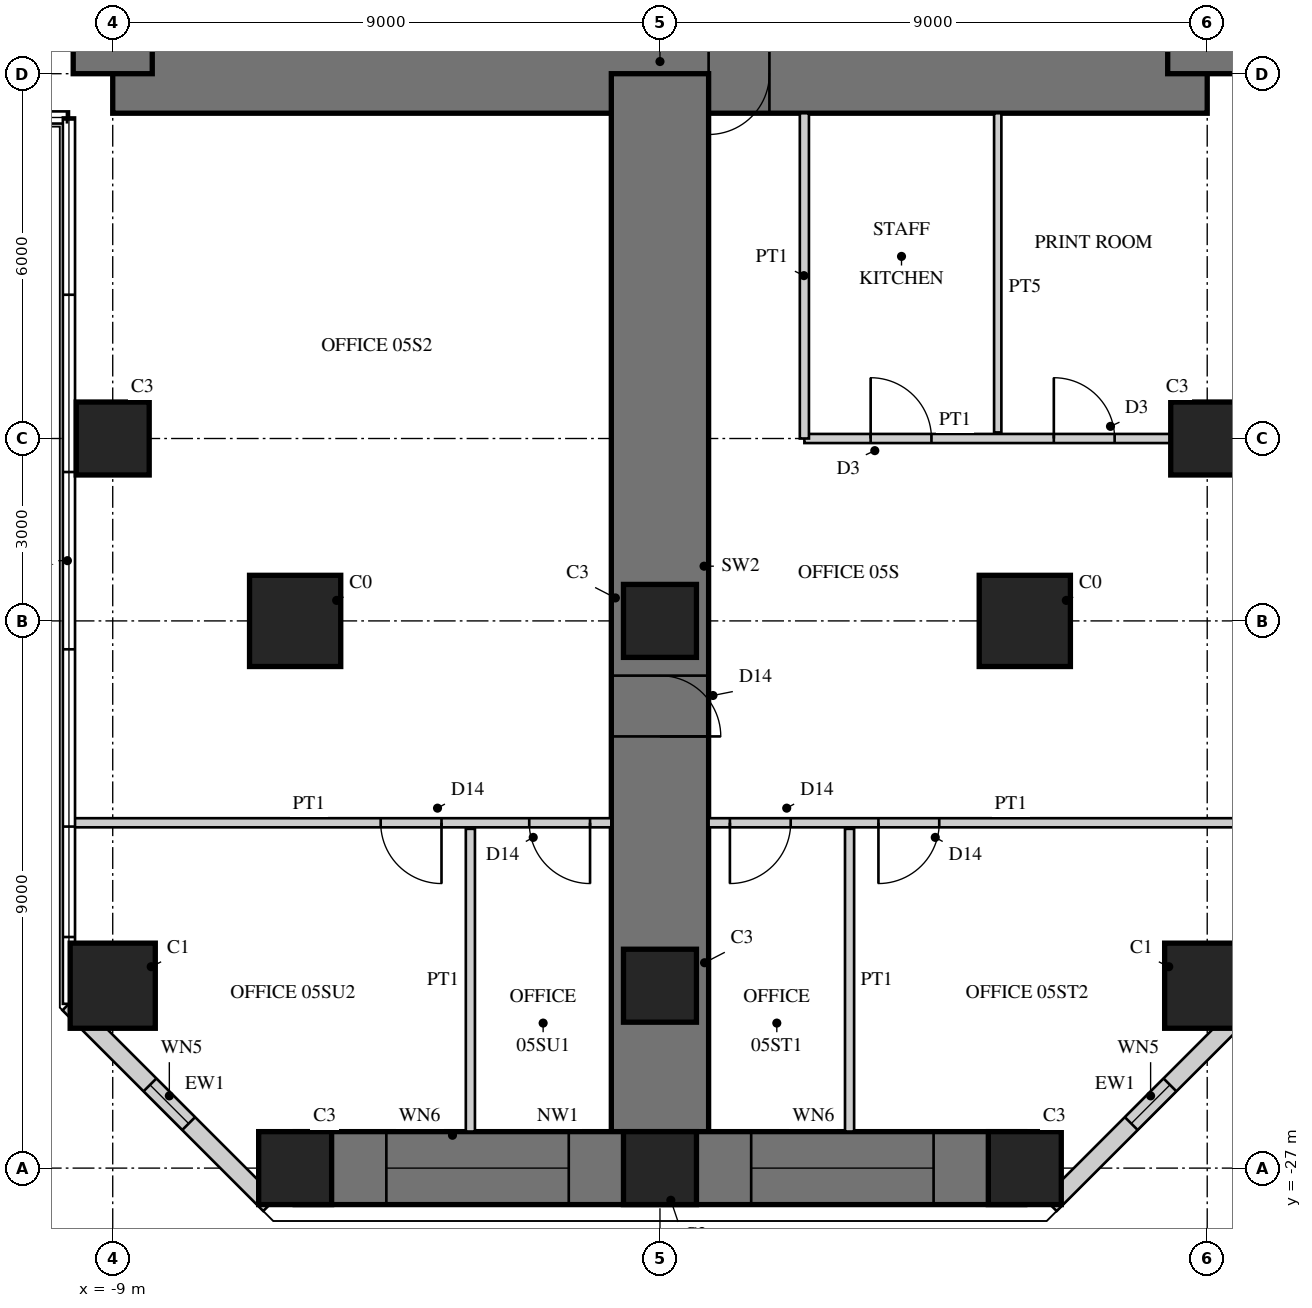
"""IFC4 building model, lengths in metres.
Left out: names, types, materials, properties, quantities, classifications, styles, units other than length and angle.
Written with IfcOpenShell. Run it as: python <this file> out.ifc"""

import sys

from ifc_helpers import new_model, si_unit, direction, frame, frame_2d, origin, origin_2d, place, context, subcontext, project, spatial, rectangle, hollow_rectangle, extrude, element, fill, save


model = new_model("IFC4")
c1 = context("Model", 3, precision=1e-05, world=origin(), true_north=direction((0.0, 1.0)))
c2 = subcontext(c1, "Body", "Model", "MODEL_VIEW")
j1 = project(units=[si_unit("LENGTHUNIT", "METRE"), si_unit("PLANEANGLEUNIT", "RADIAN")], contexts=[c1])
p1 = place(None, origin())
s1 = spatial("IfcSite", under=j1, at=p1, CompositionType="ELEMENT")
p2 = place(p1, origin())
s2 = spatial("IfcBuilding", under=s1, at=p2, CompositionType="ELEMENT")
p3 = place(p2, frame((0.0, 0.0, 23.5)))
s3 = spatial("IfcBuildingStorey", under=s2, at=p3, CompositionType="ELEMENT", Elevation=23.5)
p4 = place(p3, frame((-9.0, -9.0, 0.0), z_axis=(0.0, 0.0, 1.0), x_axis=(1.0, 0.0, 0.0)))
e1 = element("IfcWall", 1, at=p4, inside=s3, PredefinedType="SHEAR", context=c2, shape_type="SweptSolid", body=[
    extrude(rectangle(XDim=18.0, YDim=1.3, at=frame_2d((9.0, 0.0))), origin(), (0.0, 0.0, 1.0), 4.0),
])
p5 = place(p4, frame((9.8, 0.0, 0.0)))
e2 = element("IfcOpeningElement", 2, at=p5, cuts=e1, PredefinedType="OPENING", context=c2, shape_type="SweptSolid", body=[
    extrude(rectangle(XDim=1.0, YDim=2.4, at=frame_2d((0.5, 1.2))), frame((0.0, 0.66, 0.0), z_axis=(0.0, -1.0, 0.0), x_axis=(1.0, 0.0, 0.0)), (0.0, 0.0, 1.0), 1.32),
])
p6 = place(p3, frame((9.0, -9.0, 0.0), z_axis=(0.0, 0.0, 1.0), x_axis=(0.0, 1.0, 0.0)))
e3 = element("IfcWall", 3, at=p6, inside=s3, PredefinedType="SHEAR", context=c2, shape_type="SweptSolid", body=[
    extrude(rectangle(XDim=18.0, YDim=1.3, at=frame_2d((9.0, 0.0))), origin(), (0.0, 0.0, 1.0), 4.0),
])
p7 = place(p6, frame((9.8, 0.0, 0.0)))
e4 = element("IfcOpeningElement", 4, at=p7, cuts=e3, PredefinedType="OPENING", context=c2, shape_type="SweptSolid", body=[
    extrude(rectangle(XDim=1.0, YDim=2.4, at=frame_2d((0.5, 1.2))), frame((0.0, 0.66, 0.0), z_axis=(0.0, -1.0, 0.0), x_axis=(1.0, 0.0, 0.0)), (0.0, 0.0, 1.0), 1.32),
])
p8 = place(p3, frame((-9.0, 9.0, 0.0), z_axis=(0.0, 0.0, 1.0), x_axis=(0.0, -1.0, 0.0)))
e5 = element("IfcWall", 5, at=p8, inside=s3, PredefinedType="SHEAR", context=c2, shape_type="SweptSolid", body=[
    extrude(rectangle(XDim=18.0, YDim=1.3, at=frame_2d((9.0, 0.0))), origin(), (0.0, 0.0, 1.0), 4.0),
])
p9 = place(p8, frame((9.8, 0.0, 0.0)))
e6 = element("IfcOpeningElement", 6, at=p9, cuts=e5, PredefinedType="OPENING", context=c2, shape_type="SweptSolid", body=[
    extrude(rectangle(XDim=1.0, YDim=2.4, at=frame_2d((0.5, 1.2))), frame((0.0, 0.66, 0.0), z_axis=(0.0, -1.0, 0.0), x_axis=(1.0, 0.0, 0.0)), (0.0, 0.0, 1.0), 1.32),
])
p10 = place(p3, frame((0.0, -9.0, 0.0), z_axis=(0.0, 0.0, 1.0), x_axis=(0.0, -1.0, 0.0)))
e7 = element("IfcWall", 7, at=p10, inside=s3, PredefinedType="SHEAR", context=c2, shape_type="SweptSolid", body=[
    extrude(rectangle(XDim=18.0, YDim=1.6, at=frame_2d((9.0, 0.0))), origin(), (0.0, 0.0, 1.0), 4.0),
])
p11 = place(p10, frame((9.9, 0.0, 0.0)))
e8 = element("IfcOpeningElement", 8, at=p11, cuts=e7, PredefinedType="OPENING", context=c2, shape_type="SweptSolid", body=[
    extrude(rectangle(XDim=1.0, YDim=2.2, at=frame_2d((0.5, 1.1))), frame((0.0, 0.81, 0.0), z_axis=(0.0, -1.0, 0.0), x_axis=(1.0, 0.0, 0.0)), (0.0, 0.0, 1.0), 1.62),
])
p12 = place(p3, frame((-6.0, -27.0, 0.0), z_axis=(0.0, 0.0, 1.0), x_axis=(1.0, 0.0, 0.0)))
e9 = element("IfcWall", 9, at=p12, inside=s3, PredefinedType="SHEAR", context=c2, shape_type="SweptSolid", body=[
    extrude(rectangle(XDim=12.0, YDim=1.2, at=frame_2d((6.0, 0.0))), origin(), (0.0, 0.0, 1.0), 4.0),
])
p13 = place(p12, frame((1.5, 0.0, 0.6)))
e10 = element("IfcOpeningElement", 10, at=p13, cuts=e9, PredefinedType="OPENING", context=c2, shape_type="SweptSolid", body=[
    extrude(rectangle(XDim=3.0, YDim=2.4, at=frame_2d((1.5, 1.2))), frame((0.0, 0.61, 0.0), z_axis=(0.0, -1.0, 0.0), x_axis=(1.0, 0.0, 0.0)), (0.0, 0.0, 1.0), 1.22),
])
p14 = place(p12, frame((7.5, 0.0, 0.6)))
e11 = element("IfcOpeningElement", 11, at=p14, cuts=e9, PredefinedType="OPENING", context=c2, shape_type="SweptSolid", body=[
    extrude(rectangle(XDim=3.0, YDim=2.4, at=frame_2d((1.5, 1.2))), frame((0.0, 0.61, 0.0), z_axis=(0.0, -1.0, 0.0), x_axis=(1.0, 0.0, 0.0)), (0.0, 0.0, 1.0), 1.22),
])
p15 = place(p3, frame((-9.0, -15.0, 0.0), z_axis=(0.0, 0.0, 1.0), x_axis=(1.0, 0.0, 0.0)))
e12 = element("IfcColumn", 12, at=p15, inside=s3, PredefinedType="COLUMN", context=c2, shape_type="SweptSolid", body=[
    extrude(rectangle(XDim=1.2, YDim=1.2, at=origin_2d()), origin(), (0.0, 0.0, 1.0), 4.0),
])
p16 = place(p3, frame((-9.0, -24.0, 0.0), z_axis=(0.0, 0.0, 1.0), x_axis=(1.0, 0.0, 0.0)))
e13 = element("IfcColumn", 13, at=p16, inside=s3, PredefinedType="COLUMN", context=c2, shape_type="SweptSolid", body=[
    extrude(rectangle(XDim=1.4, YDim=1.4, at=origin_2d()), origin(), (0.0, 0.0, 1.0), 4.0),
])
p17 = place(p3, frame((9.0, -15.0, 0.0), z_axis=(0.0, 0.0, 1.0), x_axis=(1.0, 0.0, 0.0)))
e14 = element("IfcColumn", 14, at=p17, inside=s3, PredefinedType="COLUMN", context=c2, shape_type="SweptSolid", body=[
    extrude(rectangle(XDim=1.2, YDim=1.2, at=origin_2d()), origin(), (0.0, 0.0, 1.0), 4.0),
])
p18 = place(p3, frame((9.0, -24.0, 0.0), z_axis=(0.0, 0.0, 1.0), x_axis=(1.0, 0.0, 0.0)))
e15 = element("IfcColumn", 15, at=p18, inside=s3, PredefinedType="COLUMN", context=c2, shape_type="SweptSolid", body=[
    extrude(rectangle(XDim=1.4, YDim=1.4, at=origin_2d()), origin(), (0.0, 0.0, 1.0), 4.0),
])
for number, where, z_axis, x_axis in (
    (16, (-6.0, -27.0, 0.0), (0.0, 0.0, 1.0), (1.0, 0.0, 0.0)),
    (17, (0.0, -27.0, 0.0), (0.0, 0.0, 1.0), (1.0, 0.0, 0.0)),
    (18, (6.0, -27.0, 0.0), (0.0, 0.0, 1.0), (1.0, 0.0, 0.0)),
):
    element("IfcColumn", number, at=place(p3, frame(where, z_axis=z_axis, x_axis=x_axis)), inside=s3, PredefinedType="COLUMN", context=c2, shape_type="SweptSolid", body=[
        extrude(rectangle(XDim=1.2, YDim=1.2, at=origin_2d()), origin(), (0.0, 0.0, 1.0), 4.0),
    ])
p19 = place(p3, frame((-6.0, -18.0, -0.2), z_axis=(0.0, 0.0, 1.0), x_axis=(1.0, 0.0, 0.0)))
e19 = element("IfcColumn", 19, at=p19, inside=s3, PredefinedType="COLUMN", context=c2, shape_type="SweptSolid", body=[
    extrude(rectangle(XDim=1.5, YDim=1.5, at=origin_2d()), origin(), (0.0, 0.0, 1.0), 4.2),
])
p20 = place(p3, frame((0.0, -18.0, 0.0), z_axis=(0.0, 0.0, 1.0), x_axis=(1.0, 0.0, 0.0)))
e20 = element("IfcColumn", 20, at=p20, inside=s3, PredefinedType="COLUMN", context=c2, shape_type="SweptSolid", body=[
    extrude(rectangle(XDim=1.2, YDim=1.2, at=origin_2d()), origin(), (0.0, 0.0, 1.0), 4.0),
])
p21 = place(p3, frame((6.0, -18.0, -0.2), z_axis=(0.0, 0.0, 1.0), x_axis=(1.0, 0.0, 0.0)))
e21 = element("IfcColumn", 21, at=p21, inside=s3, PredefinedType="COLUMN", context=c2, shape_type="SweptSolid", body=[
    extrude(rectangle(XDim=1.5, YDim=1.5, at=origin_2d()), origin(), (0.0, 0.0, 1.0), 4.2),
])
p22 = place(p3, frame((0.0, -24.0, 0.0), z_axis=(0.0, 0.0, 1.0), x_axis=(1.0, 0.0, 0.0)))
e22 = element("IfcColumn", 22, at=p22, inside=s3, PredefinedType="COLUMN", context=c2, shape_type="SweptSolid", body=[
    extrude(rectangle(XDim=1.2, YDim=1.2, at=origin_2d()), origin(), (0.0, 0.0, 1.0), 4.0),
])
p23 = place(p3, frame((-9.72, -24.298, 0.0), z_axis=(0.0, 0.0, 1.0), x_axis=(0.707106781187, -0.707106781187, 0.0)))
e23 = element("IfcWall", 23, at=p23, inside=s3, PredefinedType="SOLIDWALL", context=c2, shape_type="SweptSolid", body=[
    extrude(rectangle(XDim=4.669, YDim=0.3, at=frame_2d((2.335, 0.0))), origin(), (0.0, 0.0, 1.0), 3.8),
])
p24 = place(p23, frame((1.885, 0.0, 0.3)))
e24 = element("IfcOpeningElement", 24, at=p24, cuts=e23, PredefinedType="OPENING", context=c2, shape_type="SweptSolid", body=[
    extrude(rectangle(XDim=0.9, YDim=2.4, at=frame_2d((0.45, 1.2))), frame((0.0, 0.16, 0.0), z_axis=(0.0, -1.0, 0.0), x_axis=(1.0, 0.0, 0.0)), (0.0, 0.0, 1.0), 0.32),
])
p25 = place(p3, frame((6.418, -27.6, 0.0), z_axis=(0.0, 0.0, 1.0), x_axis=(0.707106781187, 0.707106781187, 0.0)))
e25 = element("IfcWall", 25, at=p25, inside=s3, PredefinedType="SOLIDWALL", context=c2, shape_type="SweptSolid", body=[
    extrude(rectangle(XDim=4.669, YDim=0.3, at=frame_2d((2.335, 0.0))), origin(), (0.0, 0.0, 1.0), 3.8),
])
p26 = place(p25, frame((1.885, 0.0, 0.3)))
e26 = element("IfcOpeningElement", 26, at=p26, cuts=e25, PredefinedType="OPENING", context=c2, shape_type="SweptSolid", body=[
    extrude(rectangle(XDim=0.9, YDim=2.4, at=frame_2d((0.45, 1.2))), frame((0.0, 0.16, 0.0), z_axis=(0.0, -1.0, 0.0), x_axis=(1.0, 0.0, 0.0)), (0.0, 0.0, 1.0), 0.32),
])
p27 = place(p3, frame((2.375, -15.0, 0.0), z_axis=(0.0, 0.0, 1.0), x_axis=(1.0, 0.0, 0.0)))
e27 = element("IfcWall", 27, at=p27, inside=s3, PredefinedType="PARTITIONING", context=c2, shape_type="SweptSolid", body=[
    extrude(rectangle(XDim=6.025, YDim=0.15, at=frame_2d((3.012, 0.0))), origin(), (0.0, 0.0, 1.0), 2.95),
])
p28 = place(p27, frame((1.09, 0.0, 0.0)))
e28 = element("IfcOpeningElement", 28, at=p28, cuts=e27, PredefinedType="OPENING", context=c2, shape_type="SweptSolid", body=[
    extrude(rectangle(XDim=1.0, YDim=2.1, at=frame_2d((0.5, 1.05))), frame((0.0, 0.085, 0.0), z_axis=(0.0, -1.0, 0.0), x_axis=(1.0, 0.0, 0.0)), (0.0, 0.0, 1.0), 0.17),
])
p29 = place(p27, frame((4.102, 0.0, 0.0)))
e29 = element("IfcOpeningElement", 29, at=p29, cuts=e27, PredefinedType="OPENING", context=c2, shape_type="SweptSolid", body=[
    extrude(rectangle(XDim=1.0, YDim=2.1, at=frame_2d((0.5, 1.05))), frame((0.0, 0.085, 0.0), z_axis=(0.0, -1.0, 0.0), x_axis=(1.0, 0.0, 0.0)), (0.0, 0.0, 1.0), 0.17),
])
p30 = place(p3, frame((2.375, -9.65, 0.0), z_axis=(0.0, 0.0, 1.0), x_axis=(0.0, -1.0, 0.0)))
e30 = element("IfcWall", 30, at=p30, inside=s3, PredefinedType="PARTITIONING", context=c2, shape_type="SweptSolid", body=[
    extrude(rectangle(XDim=5.35, YDim=0.15, at=frame_2d((2.675, 0.0))), origin(), (0.0, 0.0, 1.0), 3.8),
])
p31 = place(p3, frame((5.555, -9.65, 0.0), z_axis=(0.0, 0.0, 1.0), x_axis=(0.0, -1.0, 0.0)))
e31 = element("IfcWall", 31, at=p31, inside=s3, PredefinedType="PLUMBINGWALL", context=c2, shape_type="SweptSolid", body=[
    extrude(rectangle(XDim=5.25, YDim=0.12, at=frame_2d((2.625, 0.0))), origin(), (0.0, 0.0, 1.0), 3.8),
])
p32 = place(p3, frame((3.118, -21.42, 0.0), z_axis=(0.0, 0.0, 1.0), x_axis=(0.0, -1.0, 0.0)))
e32 = element("IfcWall", 32, at=p32, inside=s3, PredefinedType="PARTITIONING", context=c2, shape_type="SweptSolid", body=[
    extrude(rectangle(XDim=4.98, YDim=0.15, at=frame_2d((2.49, 0.0))), origin(), (0.0, 0.0, 1.0), 3.8),
])
p33 = place(p3, frame((0.8, -21.32, 0.0), z_axis=(0.0, 0.0, 1.0), x_axis=(1.0, 0.0, 0.0)))
e33 = element("IfcWall", 33, at=p33, inside=s3, PredefinedType="PARTITIONING", context=c2, shape_type="SweptSolid", body=[
    extrude(rectangle(XDim=8.88, YDim=0.15, at=frame_2d((4.44, 0.0))), origin(), (0.0, 0.0, 1.0), 3.8),
])
p34 = place(p33, frame((0.35, 0.0, 0.0)))
e34 = element("IfcOpeningElement", 34, at=p34, cuts=e33, PredefinedType="OPENING", context=c2, shape_type="SweptSolid", body=[
    extrude(rectangle(XDim=1.0, YDim=2.2, at=frame_2d((0.5, 1.1))), frame((0.0, 0.085, 0.0), z_axis=(0.0, -1.0, 0.0), x_axis=(1.0, 0.0, 0.0)), (0.0, 0.0, 1.0), 0.17),
])
p35 = place(p33, frame((2.793, 0.0, 0.0)))
e35 = element("IfcOpeningElement", 35, at=p35, cuts=e33, PredefinedType="OPENING", context=c2, shape_type="SweptSolid", body=[
    extrude(rectangle(XDim=1.0, YDim=2.2, at=frame_2d((0.5, 1.1))), frame((0.0, 0.085, 0.0), z_axis=(0.0, -1.0, 0.0), x_axis=(1.0, 0.0, 0.0)), (0.0, 0.0, 1.0), 0.17),
])
p36 = place(p3, frame((-3.118, -21.42, 0.0), z_axis=(0.0, 0.0, 1.0), x_axis=(0.0, -1.0, 0.0)))
e36 = element("IfcWall", 36, at=p36, inside=s3, PredefinedType="PARTITIONING", context=c2, shape_type="SweptSolid", body=[
    extrude(rectangle(XDim=4.98, YDim=0.15, at=frame_2d((2.49, 0.0))), origin(), (0.0, 0.0, 1.0), 3.8),
])
p37 = place(p3, frame((-9.68, -21.32, 0.0), z_axis=(0.0, 0.0, 1.0), x_axis=(1.0, 0.0, 0.0)))
e37 = element("IfcWall", 37, at=p37, inside=s3, PredefinedType="PARTITIONING", context=c2, shape_type="SweptSolid", body=[
    extrude(rectangle(XDim=8.88, YDim=0.15, at=frame_2d((4.44, 0.0))), origin(), (0.0, 0.0, 1.0), 3.8),
])
p38 = place(p37, frame((5.087, 0.0, 0.0)))
e38 = element("IfcOpeningElement", 38, at=p38, cuts=e37, PredefinedType="OPENING", context=c2, shape_type="SweptSolid", body=[
    extrude(rectangle(XDim=1.0, YDim=2.2, at=frame_2d((0.5, 1.1))), frame((0.0, 0.085, 0.0), z_axis=(0.0, -1.0, 0.0), x_axis=(1.0, 0.0, 0.0)), (0.0, 0.0, 1.0), 0.17),
])
p39 = place(p37, frame((7.53, 0.0, 0.0)))
e39 = element("IfcOpeningElement", 39, at=p39, cuts=e37, PredefinedType="OPENING", context=c2, shape_type="SweptSolid", body=[
    extrude(rectangle(XDim=1.0, YDim=2.2, at=frame_2d((0.5, 1.1))), frame((0.0, 0.085, 0.0), z_axis=(0.0, -1.0, 0.0), x_axis=(1.0, 0.0, 0.0)), (0.0, 0.0, 1.0), 0.17),
])
p40 = place(p24, origin())
e40 = element("IfcWindow", 40, at=p40, inside=s3, PartitioningType="SINGLE_PANEL", PredefinedType="WINDOW", context=c2, shape_type="SweptSolid", body=[
    extrude(hollow_rectangle(XDim=0.9, YDim=2.4, WallThickness=0.06, at=frame_2d((0.45, 1.2))), frame((0.0, 0.03, 0.0), z_axis=(0.0, -1.0, 0.0), x_axis=(1.0, 0.0, 0.0)), (0.0, 0.0, 1.0), 0.06),
    extrude(rectangle(XDim=0.779, YDim=2.279, at=frame_2d((0.45, 1.2))), frame((0.0, 0.03, 0.0), z_axis=(0.0, -1.0, 0.0), x_axis=(1.0, 0.0, 0.0)), (0.0, 0.0, 1.0), 0.06),
])
fill(e24, e40)
p41 = place(p13, origin())
e41 = element("IfcWindow", 41, at=p41, inside=s3, PartitioningType="SINGLE_PANEL", PredefinedType="WINDOW", context=c2, shape_type="SweptSolid", body=[
    extrude(hollow_rectangle(XDim=3.0, YDim=2.4, WallThickness=0.06, at=frame_2d((1.5, 1.2))), frame((0.0, 0.03, 0.0), z_axis=(0.0, -1.0, 0.0), x_axis=(1.0, 0.0, 0.0)), (0.0, 0.0, 1.0), 0.06),
    extrude(rectangle(XDim=2.879, YDim=2.279, at=frame_2d((1.5, 1.2))), frame((0.0, 0.03, 0.0), z_axis=(0.0, -1.0, 0.0), x_axis=(1.0, 0.0, 0.0)), (0.0, 0.0, 1.0), 0.06),
])
fill(e10, e41)
p42 = place(p14, origin())
e42 = element("IfcWindow", 42, at=p42, inside=s3, PartitioningType="SINGLE_PANEL", PredefinedType="WINDOW", context=c2, shape_type="SweptSolid", body=[
    extrude(hollow_rectangle(XDim=3.0, YDim=2.4, WallThickness=0.06, at=frame_2d((1.5, 1.2))), frame((0.0, 0.03, 0.0), z_axis=(0.0, -1.0, 0.0), x_axis=(1.0, 0.0, 0.0)), (0.0, 0.0, 1.0), 0.06),
    extrude(rectangle(XDim=2.879, YDim=2.279, at=frame_2d((1.5, 1.2))), frame((0.0, 0.03, 0.0), z_axis=(0.0, -1.0, 0.0), x_axis=(1.0, 0.0, 0.0)), (0.0, 0.0, 1.0), 0.06),
])
fill(e11, e42)
p43 = place(p26, origin())
e43 = element("IfcWindow", 43, at=p43, inside=s3, PartitioningType="SINGLE_PANEL", PredefinedType="WINDOW", context=c2, shape_type="SweptSolid", body=[
    extrude(hollow_rectangle(XDim=0.9, YDim=2.4, WallThickness=0.06, at=frame_2d((0.45, 1.2))), frame((0.0, 0.03, 0.0), z_axis=(0.0, -1.0, 0.0), x_axis=(1.0, 0.0, 0.0)), (0.0, 0.0, 1.0), 0.06),
    extrude(rectangle(XDim=0.779, YDim=2.279, at=frame_2d((0.45, 1.2))), frame((0.0, 0.03, 0.0), z_axis=(0.0, -1.0, 0.0), x_axis=(1.0, 0.0, 0.0)), (0.0, 0.0, 1.0), 0.06),
])
fill(e26, e43)
p44 = place(p28, origin())
e44 = element("IfcDoor", 44, at=p44, inside=s3, OperationType="SINGLE_SWING_LEFT", PredefinedType="DOOR", context=c2, shape_type="SweptSolid", body=[
    extrude(rectangle(XDim=1.0, YDim=2.1, at=frame_2d((0.5, 1.05))), frame((0.0, 0.025, 0.0), z_axis=(0.0, -1.0, 0.0), x_axis=(1.0, 0.0, 0.0)), (0.0, 0.0, 1.0), 0.05),
])
fill(e28, e44)
p45 = place(p29, origin())
e45 = element("IfcDoor", 45, at=p45, inside=s3, OperationType="SINGLE_SWING_LEFT", PredefinedType="DOOR", context=c2, shape_type="SweptSolid", body=[
    extrude(rectangle(XDim=1.0, YDim=2.1, at=frame_2d((0.5, 1.05))), frame((0.0, 0.025, 0.0), z_axis=(0.0, -1.0, 0.0), x_axis=(1.0, 0.0, 0.0)), (0.0, 0.0, 1.0), 0.05),
])
fill(e29, e45)
p46 = place(p34, frame((1.0, 0.0, 0.0), z_axis=(0.0, 0.0, 1.0), x_axis=(-1.0, 0.0, 0.0)))
e46 = element("IfcDoor", 46, at=p46, inside=s3, OperationType="SINGLE_SWING_RIGHT", PredefinedType="DOOR", context=c2, shape_type="SweptSolid", body=[
    extrude(rectangle(XDim=1.0, YDim=2.2, at=frame_2d((0.5, 1.1))), frame((0.0, 0.025, 0.0), z_axis=(0.0, -1.0, 0.0), x_axis=(1.0, 0.0, 0.0)), (0.0, 0.0, 1.0), 0.05),
])
fill(e34, e46)
p47 = place(p35, frame((1.0, 0.0, 0.0), z_axis=(0.0, 0.0, 1.0), x_axis=(-1.0, 0.0, 0.0)))
e47 = element("IfcDoor", 47, at=p47, inside=s3, OperationType="SINGLE_SWING_RIGHT", PredefinedType="DOOR", context=c2, shape_type="SweptSolid", body=[
    extrude(rectangle(XDim=1.0, YDim=2.2, at=frame_2d((0.5, 1.1))), frame((0.0, 0.025, 0.0), z_axis=(0.0, -1.0, 0.0), x_axis=(1.0, 0.0, 0.0)), (0.0, 0.0, 1.0), 0.05),
])
fill(e35, e47)
p48 = place(p38, frame((1.0, 0.0, 0.0), z_axis=(0.0, 0.0, 1.0), x_axis=(-1.0, 0.0, 0.0)))
e48 = element("IfcDoor", 48, at=p48, inside=s3, OperationType="SINGLE_SWING_LEFT", PredefinedType="DOOR", context=c2, shape_type="SweptSolid", body=[
    extrude(rectangle(XDim=1.0, YDim=2.2, at=frame_2d((0.5, 1.1))), frame((0.0, 0.025, 0.0), z_axis=(0.0, -1.0, 0.0), x_axis=(1.0, 0.0, 0.0)), (0.0, 0.0, 1.0), 0.05),
])
fill(e38, e48)
p49 = place(p39, frame((1.0, 0.0, 0.0), z_axis=(0.0, 0.0, 1.0), x_axis=(-1.0, 0.0, 0.0)))
e49 = element("IfcDoor", 49, at=p49, inside=s3, OperationType="SINGLE_SWING_LEFT", PredefinedType="DOOR", context=c2, shape_type="SweptSolid", body=[
    extrude(rectangle(XDim=1.0, YDim=2.2, at=frame_2d((0.5, 1.1))), frame((0.0, 0.025, 0.0), z_axis=(0.0, -1.0, 0.0), x_axis=(1.0, 0.0, 0.0)), (0.0, 0.0, 1.0), 0.05),
])
fill(e39, e49)
p50 = place(p11, origin())
e50 = element("IfcDoor", 50, at=p50, inside=s3, OperationType="SINGLE_SWING_RIGHT", PredefinedType="DOOR", context=c2, shape_type="SweptSolid", body=[
    extrude(rectangle(XDim=1.0, YDim=2.2, at=frame_2d((0.5, 1.1))), frame((0.0, 0.025, 0.0), z_axis=(0.0, -1.0, 0.0), x_axis=(1.0, 0.0, 0.0)), (0.0, 0.0, 1.0), 0.05),
])
fill(e8, e50)
p51 = place(p5, frame((1.0, 0.0, 0.0), z_axis=(0.0, 0.0, 1.0), x_axis=(-1.0, 0.0, 0.0)))
e51 = element("IfcDoor", 51, at=p51, inside=s3, OperationType="SINGLE_SWING_RIGHT", PredefinedType="DOOR", context=c2, shape_type="SweptSolid", body=[
    extrude(rectangle(XDim=1.0, YDim=2.4, at=frame_2d((0.5, 1.2))), frame((0.0, -0.005, 0.0), z_axis=(0.0, -1.0, 0.0), x_axis=(1.0, 0.0, 0.0)), (0.0, 0.0, 1.0), 0.05),
])
fill(e2, e51)
save(model, sys.argv[1])
